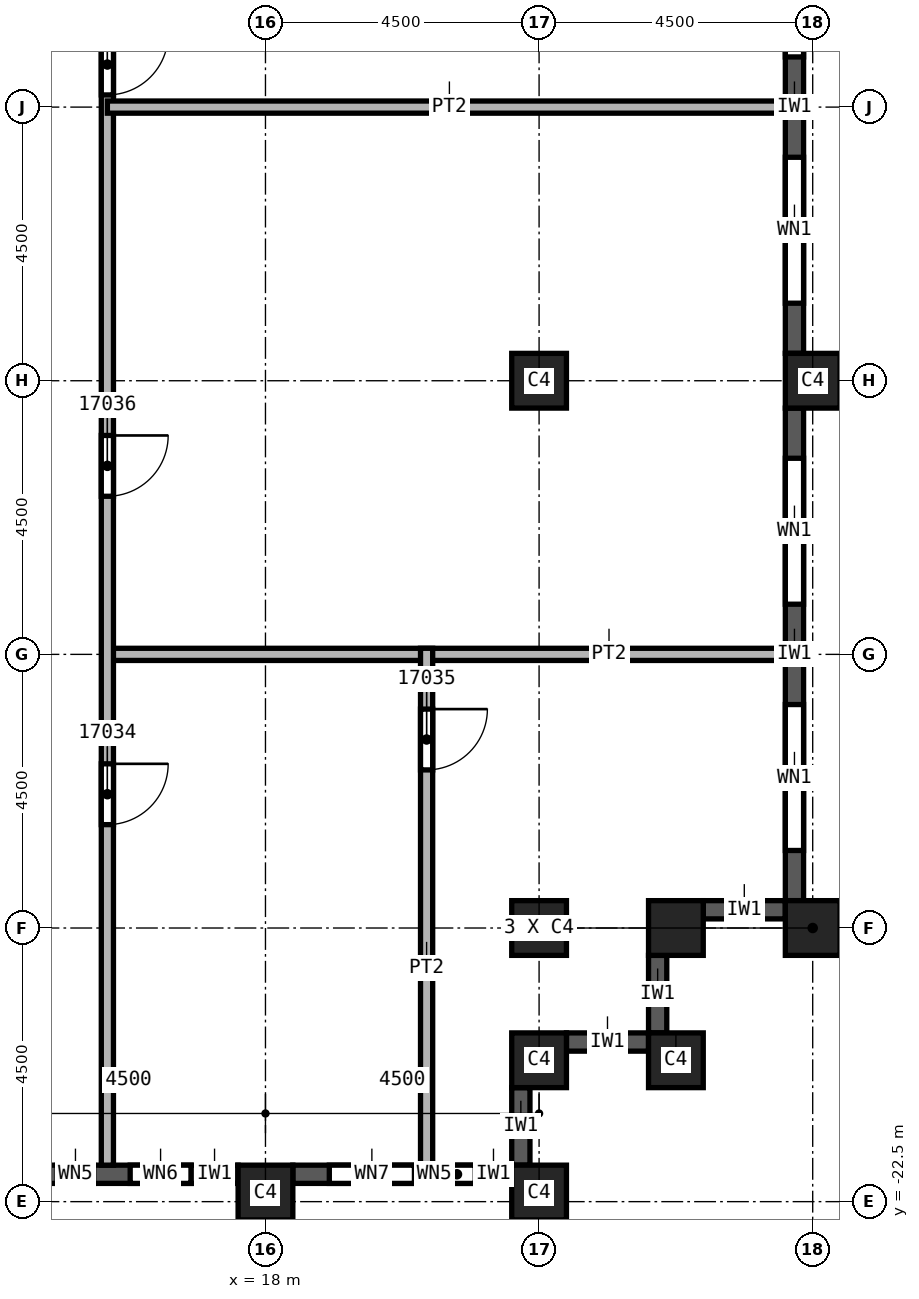
"""IFC4 building model, lengths in metres.
Left out: names, types, materials, properties, quantities, classifications, styles, units other than length and angle.
Written with IfcOpenShell. Run it as: python <this file> out.ifc"""

import sys

from ifc_helpers import new_model, si_unit, direction, frame, frame_2d, origin, origin_2d, place, context, subcontext, project, spatial, rectangle, extrude, element, fill, save


model = new_model("IFC4")
c1 = context("Model", 3, precision=1e-05, world=origin(), true_north=direction((0.0, 1.0)))
c2 = subcontext(c1, "Body", "Model", "MODEL_VIEW")
j1 = project(units=[si_unit("LENGTHUNIT", "METRE"), si_unit("PLANEANGLEUNIT", "RADIAN")], contexts=[c1])
p1 = place(None, origin())
s1 = spatial("IfcSite", under=j1, at=p1, CompositionType="ELEMENT")
p2 = place(p1, origin())
s2 = spatial("IfcBuilding", under=s1, at=p2, CompositionType="ELEMENT")
p3 = place(p2, frame((0.0, 0.0, 254.0)))
s3 = spatial("IfcBuildingStorey", under=s2, at=p3, CompositionType="ELEMENT", Elevation=254.0)
for number, where, z_axis, x_axis in (
    (1, (22.5, -9.0, 0.0), (0.0, 0.0, 1.0), (1.0, 0.0, 0.0)),
    (2, (22.5, -18.0, 0.0), (0.0, 0.0, 1.0), (1.0, 0.0, 0.0)),
    (3, (27.0, -9.0, 0.0), (0.0, 0.0, 1.0), (0.0, 1.0, 0.0)),
    (4, (27.0, -18.0, 0.0), (0.0, 0.0, 1.0), (0.0, 1.0, 0.0)),
    (5, (18.0, -22.35, 0.0), (0.0, 0.0, 1.0), (1.0, 0.0, 0.0)),
    (6, (22.5, -22.35, 0.0), (0.0, 0.0, 1.0), (1.0, 0.0, 0.0)),
    (7, (22.5, -20.175, 0.0), (0.0, 0.0, 1.0), (1.0, 0.0, 0.0)),
    (8, (24.75, -20.175, 0.0), (0.0, 0.0, 1.0), (1.0, 0.0, 0.0)),
    (9, (24.75, -18.0, 0.0), (0.0, 0.0, 1.0), (1.0, 0.0, 0.0)),
):
    element("IfcColumn", number, at=place(p3, frame(where, z_axis=z_axis, x_axis=x_axis)), inside=s3, PredefinedType="COLUMN", context=c2, shape_type="SweptSolid", body=[
        extrude(rectangle(XDim=0.9, YDim=0.9, at=origin_2d()), origin(), (0.0, 0.0, 1.0), 3.72),
    ])
p4 = place(p3, frame((13.95, -22.05, 0.0), z_axis=(0.0, 0.0, 1.0), x_axis=(1.0, 0.0, 0.0)))
e10 = element("IfcWall", 10, at=p4, inside=s3, PredefinedType="SOLIDWALL", context=c2, shape_type="SweptSolid", body=[
    extrude(rectangle(XDim=3.6, YDim=0.3, at=frame_2d((1.8, 0.0))), origin(), (0.0, 0.0, 1.0), 3.12),
])
p5 = place(p4, frame((0.625, 0.0, 0.8)))
e11 = element("IfcOpeningElement", 11, at=p5, cuts=e10, PredefinedType="OPENING", context=c2, shape_type="SweptSolid", body=[
    extrude(rectangle(XDim=0.6, YDim=1.95, at=frame_2d((0.3, 0.975))), frame((0.0, 0.15, 0.0), z_axis=(0.0, -1.0, 0.0), x_axis=(1.0, 0.0, 0.0)), (0.0, 0.0, 1.0), 0.3),
])
p6 = place(p4, frame((1.825, 0.0, 0.8)))
e12 = element("IfcOpeningElement", 12, at=p6, cuts=e10, PredefinedType="OPENING", context=c2, shape_type="SweptSolid", body=[
    extrude(rectangle(XDim=1.0, YDim=1.95, at=frame_2d((0.5, 0.975))), frame((0.0, 0.15, 0.0), z_axis=(0.0, -1.0, 0.0), x_axis=(1.0, 0.0, 0.0)), (0.0, 0.0, 1.0), 0.3),
])
p7 = place(p3, frame((18.45, -22.05, 0.0), z_axis=(0.0, 0.0, 1.0), x_axis=(1.0, 0.0, 0.0)))
e13 = element("IfcWall", 13, at=p7, inside=s3, PredefinedType="SOLIDWALL", context=c2, shape_type="SweptSolid", body=[
    extrude(rectangle(XDim=3.6, YDim=0.3, at=frame_2d((1.8, 0.0))), origin(), (0.0, 0.0, 1.0), 3.12),
])
p8 = place(p7, frame((0.6, 0.0, 0.8)))
e14 = element("IfcOpeningElement", 14, at=p8, cuts=e13, PredefinedType="OPENING", context=c2, shape_type="SweptSolid", body=[
    extrude(rectangle(XDim=1.4, YDim=1.95, at=frame_2d((0.7, 0.975))), frame((0.0, 0.15, 0.0), z_axis=(0.0, -1.0, 0.0), x_axis=(1.0, 0.0, 0.0)), (0.0, 0.0, 1.0), 0.3),
])
p9 = place(p7, frame((2.4, 0.0, 0.8)))
e15 = element("IfcOpeningElement", 15, at=p9, cuts=e13, PredefinedType="OPENING", context=c2, shape_type="SweptSolid", body=[
    extrude(rectangle(XDim=0.6, YDim=1.95, at=frame_2d((0.3, 0.975))), frame((0.0, 0.15, 0.0), z_axis=(0.0, -1.0, 0.0), x_axis=(1.0, 0.0, 0.0)), (0.0, 0.0, 1.0), 0.3),
])
p10 = place(p3, frame((22.2, -21.9, 0.0), z_axis=(0.0, 0.0, 1.0), x_axis=(0.0, 1.0, 0.0)))
e16 = element("IfcWall", 16, at=p10, inside=s3, PredefinedType="SOLIDWALL", context=c2, shape_type="SweptSolid", body=[
    extrude(rectangle(XDim=1.275, YDim=0.3, at=frame_2d((0.637, 0.0))), origin(), (0.0, 0.0, 1.0), 3.12),
])
p11 = place(p3, frame((22.95, -19.875, 0.0), z_axis=(0.0, 0.0, 1.0), x_axis=(1.0, 0.0, 0.0)))
e17 = element("IfcWall", 17, at=p11, inside=s3, PredefinedType="SOLIDWALL", context=c2, shape_type="SweptSolid", body=[
    extrude(rectangle(XDim=1.35, YDim=0.3, at=frame_2d((0.675, 0.0))), origin(), (0.0, 0.0, 1.0), 3.12),
])
p12 = place(p3, frame((24.45, -19.725, 0.0), z_axis=(0.0, 0.0, 1.0), x_axis=(0.0, 1.0, 0.0)))
e18 = element("IfcWall", 18, at=p12, inside=s3, PredefinedType="SOLIDWALL", context=c2, shape_type="SweptSolid", body=[
    extrude(rectangle(XDim=1.275, YDim=0.3, at=frame_2d((0.638, 0.0))), origin(), (0.0, 0.0, 1.0), 3.12),
])
p13 = place(p3, frame((25.2, -17.7, 0.0), z_axis=(0.0, 0.0, 1.0), x_axis=(1.0, 0.0, 0.0)))
e19 = element("IfcWall", 19, at=p13, inside=s3, PredefinedType="SOLIDWALL", context=c2, shape_type="SweptSolid", body=[
    extrude(rectangle(XDim=1.35, YDim=0.3, at=frame_2d((0.675, 0.0))), origin(), (0.0, 0.0, 1.0), 3.12),
])
p14 = place(p3, frame((26.7, -17.55, 0.0), z_axis=(0.0, 0.0, 1.0), x_axis=(0.0, 1.0, 0.0)))
e20 = element("IfcWall", 20, at=p14, inside=s3, PredefinedType="SOLIDWALL", context=c2, shape_type="SweptSolid", body=[
    extrude(rectangle(XDim=8.1, YDim=0.3, at=frame_2d((4.05, 0.0))), origin(), (0.0, 0.0, 1.0), 3.12),
])
p15 = place(p14, frame((0.825, 0.0, 0.8)))
e21 = element("IfcOpeningElement", 21, at=p15, cuts=e20, PredefinedType="OPENING", context=c2, shape_type="SweptSolid", body=[
    extrude(rectangle(XDim=2.4, YDim=1.95, at=frame_2d((1.2, 0.975))), frame((0.0, 0.15, 0.0), z_axis=(0.0, -1.0, 0.0), x_axis=(1.0, 0.0, 0.0)), (0.0, 0.0, 1.0), 0.3),
])
p16 = place(p14, frame((4.875, 0.0, 0.8)))
e22 = element("IfcOpeningElement", 22, at=p16, cuts=e20, PredefinedType="OPENING", context=c2, shape_type="SweptSolid", body=[
    extrude(rectangle(XDim=2.4, YDim=1.95, at=frame_2d((1.2, 0.975))), frame((0.0, 0.15, 0.0), z_axis=(0.0, -1.0, 0.0), x_axis=(1.0, 0.0, 0.0)), (0.0, 0.0, 1.0), 0.3),
])
p17 = place(p3, frame((26.7, -8.55, 0.0), z_axis=(0.0, 0.0, 1.0), x_axis=(0.0, 1.0, 0.0)))
e23 = element("IfcWall", 23, at=p17, inside=s3, PredefinedType="SOLIDWALL", context=c2, shape_type="SweptSolid", body=[
    extrude(rectangle(XDim=8.1, YDim=0.3, at=frame_2d((4.05, 0.0))), origin(), (0.0, 0.0, 1.0), 3.12),
])
p18 = place(p17, frame((0.825, 0.0, 0.8)))
e24 = element("IfcOpeningElement", 24, at=p18, cuts=e23, PredefinedType="OPENING", context=c2, shape_type="SweptSolid", body=[
    extrude(rectangle(XDim=2.4, YDim=1.95, at=frame_2d((1.2, 0.975))), frame((0.0, 0.15, 0.0), z_axis=(0.0, -1.0, 0.0), x_axis=(1.0, 0.0, 0.0)), (0.0, 0.0, 1.0), 0.3),
])
p19 = place(p17, frame((4.875, 0.0, 0.8)))
e25 = element("IfcOpeningElement", 25, at=p19, cuts=e23, PredefinedType="OPENING", context=c2, shape_type="SweptSolid", body=[
    extrude(rectangle(XDim=2.4, YDim=1.95, at=frame_2d((1.2, 0.975))), frame((0.0, 0.15, 0.0), z_axis=(0.0, -1.0, 0.0), x_axis=(1.0, 0.0, 0.0)), (0.0, 0.0, 1.0), 0.3),
])
p20 = place(p3, frame((15.4, -13.5, 0.0), z_axis=(0.0, 0.0, 1.0), x_axis=(1.0, 0.0, 0.0)))
e26 = element("IfcWall", 26, at=p20, inside=s3, PredefinedType="PARTITIONING", context=c2, shape_type="SweptSolid", body=[
    extrude(rectangle(XDim=11.15, YDim=0.2, at=frame_2d((5.575, 0.0))), origin(), (0.0, 0.0, 1.0), 3.72),
])
p21 = place(p3, frame((15.4, 21.9, 0.0), z_axis=(0.0, 0.0, 1.0), x_axis=(0.0, -1.0, 0.0)))
e27 = element("IfcWall", 27, at=p21, inside=s3, PredefinedType="PARTITIONING", context=c2, shape_type="SweptSolid", body=[
    extrude(rectangle(XDim=43.8, YDim=0.2, at=frame_2d((21.9, 0.0))), origin(), (0.0, 0.0, 1.0), 3.72),
])
p22 = place(p21, frame((19.65, 0.0, 0.0)))
e28 = element("IfcOpeningElement", 28, at=p22, cuts=e27, PredefinedType="OPENING", context=c2, shape_type="SweptSolid", body=[
    extrude(rectangle(XDim=1.0, YDim=2.1, at=frame_2d((0.5, 1.05))), frame((0.0, 0.1, 0.0), z_axis=(0.0, -1.0, 0.0), x_axis=(1.0, 0.0, 0.0)), (0.0, 0.0, 1.0), 0.2),
])
p23 = place(p21, frame((11.625, 0.0, 0.0)))
e29 = element("IfcOpeningElement", 29, at=p23, cuts=e27, PredefinedType="OPENING", context=c2, shape_type="SweptSolid", body=[
    extrude(rectangle(XDim=1.0, YDim=2.1, at=frame_2d((0.5, 1.05))), frame((0.0, 0.1, 0.0), z_axis=(0.0, -1.0, 0.0), x_axis=(1.0, 0.0, 0.0)), (0.0, 0.0, 1.0), 0.2),
])
p24 = place(p21, frame((7.35, 0.0, 0.0)))
e30 = element("IfcOpeningElement", 30, at=p24, cuts=e27, PredefinedType="OPENING", context=c2, shape_type="SweptSolid", body=[
    extrude(rectangle(XDim=1.0, YDim=2.1, at=frame_2d((0.5, 1.05))), frame((0.0, 0.1, 0.0), z_axis=(0.0, -1.0, 0.0), x_axis=(1.0, 0.0, 0.0)), (0.0, 0.0, 1.0), 0.2),
])
p25 = place(p21, frame((1.75, 0.0, 0.0)))
e31 = element("IfcOpeningElement", 31, at=p25, cuts=e27, PredefinedType="OPENING", context=c2, shape_type="SweptSolid", body=[
    extrude(rectangle(XDim=1.0, YDim=2.1, at=frame_2d((0.5, 1.05))), frame((0.0, 0.1, 0.0), z_axis=(0.0, -1.0, 0.0), x_axis=(1.0, 0.0, 0.0)), (0.0, 0.0, 1.0), 0.2),
])
p26 = place(p21, frame((37.2, 0.0, 0.0)))
e32 = element("IfcOpeningElement", 32, at=p26, cuts=e27, PredefinedType="OPENING", context=c2, shape_type="SweptSolid", body=[
    extrude(rectangle(XDim=1.0, YDim=2.1, at=frame_2d((0.5, 1.05))), frame((0.0, 0.1, 0.0), z_axis=(0.0, -1.0, 0.0), x_axis=(1.0, 0.0, 0.0)), (0.0, 0.0, 1.0), 0.2),
])
p27 = place(p21, frame((31.8, 0.0, 0.0)))
e33 = element("IfcOpeningElement", 33, at=p27, cuts=e27, PredefinedType="OPENING", context=c2, shape_type="SweptSolid", body=[
    extrude(rectangle(XDim=1.0, YDim=2.1, at=frame_2d((0.5, 1.05))), frame((0.0, 0.1, 0.0), z_axis=(0.0, -1.0, 0.0), x_axis=(1.0, 0.0, 0.0)), (0.0, 0.0, 1.0), 0.2),
])
p28 = place(p21, frame((25.2, 0.0, 0.0)))
e34 = element("IfcOpeningElement", 34, at=p28, cuts=e27, PredefinedType="OPENING", context=c2, shape_type="SweptSolid", body=[
    extrude(rectangle(XDim=1.0, YDim=2.1, at=frame_2d((0.5, 1.05))), frame((0.0, 0.1, 0.0), z_axis=(0.0, -1.0, 0.0), x_axis=(1.0, 0.0, 0.0)), (0.0, 0.0, 1.0), 0.2),
])
p29 = place(p3, frame((15.4, -4.5, 0.0), z_axis=(0.0, 0.0, 1.0), x_axis=(1.0, 0.0, 0.0)))
e35 = element("IfcWall", 35, at=p29, inside=s3, PredefinedType="PARTITIONING", context=c2, shape_type="SweptSolid", body=[
    extrude(rectangle(XDim=11.15, YDim=0.2, at=frame_2d((5.575, 0.0))), origin(), (0.0, 0.0, 1.0), 3.72),
])
p30 = place(p3, frame((20.65, -13.4, 0.0), z_axis=(0.0, 0.0, 1.0), x_axis=(0.0, -1.0, 0.0)))
e36 = element("IfcWall", 36, at=p30, inside=s3, PredefinedType="PARTITIONING", context=c2, shape_type="SweptSolid", body=[
    extrude(rectangle(XDim=8.5, YDim=0.2, at=frame_2d((4.25, 0.0))), origin(), (0.0, 0.0, 1.0), 3.72),
])
p31 = place(p30, frame((1.0, 0.0, 0.0)))
e37 = element("IfcOpeningElement", 37, at=p31, cuts=e36, PredefinedType="OPENING", context=c2, shape_type="SweptSolid", body=[
    extrude(rectangle(XDim=1.0, YDim=2.1, at=frame_2d((0.5, 1.05))), frame((0.0, 0.1, 0.0), z_axis=(0.0, -1.0, 0.0), x_axis=(1.0, 0.0, 0.0)), (0.0, 0.0, 1.0), 0.2),
])
p32 = place(p15, origin())
e38 = element("IfcWindow", 38, at=p32, inside=s3, PartitioningType="SINGLE_PANEL", PredefinedType="WINDOW", context=c2, shape_type="SweptSolid", body=[
    extrude(rectangle(XDim=2.4, YDim=1.95, at=frame_2d((1.2, 0.975))), frame((0.0, 0.03, 0.0), z_axis=(0.0, -1.0, 0.0), x_axis=(1.0, 0.0, 0.0)), (0.0, 0.0, 1.0), 0.06),
])
fill(e21, e38)
p33 = place(p16, origin())
e39 = element("IfcWindow", 39, at=p33, inside=s3, PartitioningType="SINGLE_PANEL", PredefinedType="WINDOW", context=c2, shape_type="SweptSolid", body=[
    extrude(rectangle(XDim=2.4, YDim=1.95, at=frame_2d((1.2, 0.975))), frame((0.0, 0.03, 0.0), z_axis=(0.0, -1.0, 0.0), x_axis=(1.0, 0.0, 0.0)), (0.0, 0.0, 1.0), 0.06),
])
fill(e22, e39)
p34 = place(p18, origin())
e40 = element("IfcWindow", 40, at=p34, inside=s3, PartitioningType="SINGLE_PANEL", PredefinedType="WINDOW", context=c2, shape_type="SweptSolid", body=[
    extrude(rectangle(XDim=2.4, YDim=1.95, at=frame_2d((1.2, 0.975))), frame((0.0, 0.03, 0.0), z_axis=(0.0, -1.0, 0.0), x_axis=(1.0, 0.0, 0.0)), (0.0, 0.0, 1.0), 0.06),
])
fill(e24, e40)
p35 = place(p19, origin())
e41 = element("IfcWindow", 41, at=p35, inside=s3, PartitioningType="SINGLE_PANEL", PredefinedType="WINDOW", context=c2, shape_type="SweptSolid", body=[
    extrude(rectangle(XDim=2.4, YDim=1.95, at=frame_2d((1.2, 0.975))), frame((0.0, 0.03, 0.0), z_axis=(0.0, -1.0, 0.0), x_axis=(1.0, 0.0, 0.0)), (0.0, 0.0, 1.0), 0.06),
])
fill(e25, e41)
p36 = place(p26, origin())
e42 = element("IfcDoor", 42, at=p36, inside=s3, OperationType="SINGLE_SWING_LEFT", PredefinedType="DOOR", context=c2, shape_type="SweptSolid", body=[
    extrude(rectangle(XDim=1.0, YDim=2.1, at=frame_2d((0.5, 1.05))), frame((0.0, 0.025, 0.0), z_axis=(0.0, -1.0, 0.0), x_axis=(1.0, 0.0, 0.0)), (0.0, 0.0, 1.0), 0.05),
])
fill(e32, e42)
p37 = place(p31, origin())
e43 = element("IfcDoor", 43, at=p37, inside=s3, OperationType="SINGLE_SWING_RIGHT", PredefinedType="DOOR", context=c2, shape_type="SweptSolid", body=[
    extrude(rectangle(XDim=1.0, YDim=2.1, at=frame_2d((0.5, 1.05))), frame((0.0, 0.025, 0.0), z_axis=(0.0, -1.0, 0.0), x_axis=(1.0, 0.0, 0.0)), (0.0, 0.0, 1.0), 0.05),
])
fill(e37, e43)
p38 = place(p27, origin())
e44 = element("IfcDoor", 44, at=p38, inside=s3, OperationType="SINGLE_SWING_LEFT", PredefinedType="DOOR", context=c2, shape_type="SweptSolid", body=[
    extrude(rectangle(XDim=1.0, YDim=2.1, at=frame_2d((0.5, 1.05))), frame((0.0, 0.025, 0.0), z_axis=(0.0, -1.0, 0.0), x_axis=(1.0, 0.0, 0.0)), (0.0, 0.0, 1.0), 0.05),
])
fill(e33, e44)
p39 = place(p28, origin())
e45 = element("IfcDoor", 45, at=p39, inside=s3, OperationType="SINGLE_SWING_RIGHT", PredefinedType="DOOR", context=c2, shape_type="SweptSolid", body=[
    extrude(rectangle(XDim=1.0, YDim=2.1, at=frame_2d((0.5, 1.05))), frame((0.0, 0.025, 0.0), z_axis=(0.0, -1.0, 0.0), x_axis=(1.0, 0.0, 0.0)), (0.0, 0.0, 1.0), 0.05),
])
fill(e34, e45)
p40 = place(p5, origin())
e46 = element("IfcWindow", 46, at=p40, inside=s3, PartitioningType="SINGLE_PANEL", PredefinedType="WINDOW", context=c2, shape_type="SweptSolid", body=[
    extrude(rectangle(XDim=0.6, YDim=1.95, at=frame_2d((0.3, 0.975))), frame((0.0, 0.03, 0.0), z_axis=(0.0, -1.0, 0.0), x_axis=(1.0, 0.0, 0.0)), (0.0, 0.0, 1.0), 0.06),
])
fill(e11, e46)
p41 = place(p6, origin())
e47 = element("IfcWindow", 47, at=p41, inside=s3, PartitioningType="SINGLE_PANEL", PredefinedType="WINDOW", context=c2, shape_type="SweptSolid", body=[
    extrude(rectangle(XDim=1.0, YDim=1.95, at=frame_2d((0.5, 0.975))), frame((0.0, 0.03, 0.0), z_axis=(0.0, -1.0, 0.0), x_axis=(1.0, 0.0, 0.0)), (0.0, 0.0, 1.0), 0.06),
])
fill(e12, e47)
p42 = place(p8, origin())
e48 = element("IfcWindow", 48, at=p42, inside=s3, PartitioningType="SINGLE_PANEL", PredefinedType="WINDOW", context=c2, shape_type="SweptSolid", body=[
    extrude(rectangle(XDim=1.4, YDim=1.95, at=frame_2d((0.7, 0.975))), frame((0.0, 0.03, 0.0), z_axis=(0.0, -1.0, 0.0), x_axis=(1.0, 0.0, 0.0)), (0.0, 0.0, 1.0), 0.06),
])
fill(e14, e48)
p43 = place(p9, origin())
e49 = element("IfcWindow", 49, at=p43, inside=s3, PartitioningType="SINGLE_PANEL", PredefinedType="WINDOW", context=c2, shape_type="SweptSolid", body=[
    extrude(rectangle(XDim=0.6, YDim=1.95, at=frame_2d((0.3, 0.975))), frame((0.0, 0.03, 0.0), z_axis=(0.0, -1.0, 0.0), x_axis=(1.0, 0.0, 0.0)), (0.0, 0.0, 1.0), 0.06),
])
fill(e15, e49)
save(model, sys.argv[1])
